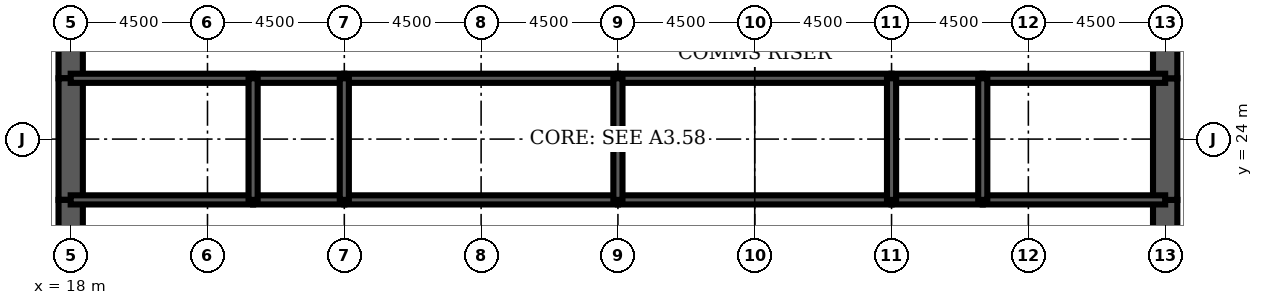
"""IFC4 building model, lengths in metres.
Left out: names, types, materials, properties, quantities, classifications, styles, units other than length and angle.
Written with IfcOpenShell. Run it as: python <this file> out.ifc"""

import sys

from ifc_helpers import new_model, si_unit, direction, frame, frame_2d, origin, place, context, subcontext, project, spatial, rectangle, extrude, element, fill, save


model = new_model("IFC4")
c1 = context("Model", 3, precision=1e-05, world=origin(), true_north=direction((0.0, 1.0)))
c2 = subcontext(c1, "Body", "Model", "MODEL_VIEW")
j1 = project(units=[si_unit("LENGTHUNIT", "METRE"), si_unit("PLANEANGLEUNIT", "RADIAN")], contexts=[c1])
p1 = place(None, origin())
s1 = spatial("IfcSite", under=j1, at=p1, CompositionType="ELEMENT")
p2 = place(p1, origin())
s2 = spatial("IfcBuilding", under=s1, at=p2, CompositionType="ELEMENT")
p3 = place(p2, frame((0.0, 0.0, 248.8)))
s3 = spatial("IfcBuildingStorey", under=s2, at=p3, CompositionType="ELEMENT", Elevation=248.8)
p4 = place(p3, frame((18.0, 28.8, 0.0), z_axis=(0.0, 0.0, 1.0), x_axis=(0.0, -1.0, 0.0)))
e1 = element("IfcWall", 1, at=p4, inside=s3, PredefinedType="SHEAR", context=c2, shape_type="SweptSolid", body=[
    extrude(rectangle(XDim=2.8, YDim=0.8, at=frame_2d((1.4, 0.0))), origin(), (0.0, 0.0, 1.0), 4.2),
])
p5 = place(p4, frame((0.4, 0.0, 0.0)))
e2 = element("IfcOpeningElement", 2, at=p5, cuts=e1, PredefinedType="OPENING", context=c2, shape_type="SweptSolid", body=[
    extrude(rectangle(XDim=1.8, YDim=2.1, at=frame_2d((0.9, 1.05))), frame((0.0, 0.41, 0.0), z_axis=(0.0, -1.0, 0.0), x_axis=(1.0, 0.0, 0.0)), (0.0, 0.0, 1.0), 0.82),
])
p6 = place(p3, frame((18.0, 26.0, 0.0), z_axis=(0.0, 0.0, 1.0), x_axis=(0.0, -1.0, 0.0)))
e3 = element("IfcWall", 3, at=p6, inside=s3, PredefinedType="SHEAR", context=c2, shape_type="SweptSolid", body=[
    extrude(rectangle(XDim=4.0, YDim=0.8, at=frame_2d((2.0, 0.0))), origin(), (0.0, 0.0, 1.0), 4.2),
])
p7 = place(p3, frame((18.0, 22.0, 0.0), z_axis=(0.0, 0.0, 1.0), x_axis=(0.0, -1.0, 0.0)))
e4 = element("IfcWall", 4, at=p7, inside=s3, PredefinedType="SHEAR", context=c2, shape_type="SweptSolid", body=[
    extrude(rectangle(XDim=2.8, YDim=0.8, at=frame_2d((1.4, 0.0))), origin(), (0.0, 0.0, 1.0), 4.2),
])
p8 = place(p7, frame((0.6, 0.0, 0.0)))
e5 = element("IfcOpeningElement", 5, at=p8, cuts=e4, PredefinedType="OPENING", context=c2, shape_type="SweptSolid", body=[
    extrude(rectangle(XDim=1.8, YDim=2.1, at=frame_2d((0.9, 1.05))), frame((0.0, 0.41, 0.0), z_axis=(0.0, -1.0, 0.0), x_axis=(1.0, 0.0, 0.0)), (0.0, 0.0, 1.0), 0.82),
])
p9 = place(p3, frame((54.0, 19.2, 0.0), z_axis=(0.0, 0.0, 1.0), x_axis=(0.0, 1.0, 0.0)))
e6 = element("IfcWall", 6, at=p9, inside=s3, PredefinedType="SHEAR", context=c2, shape_type="SweptSolid", body=[
    extrude(rectangle(XDim=2.8, YDim=0.8, at=frame_2d((1.4, 0.0))), origin(), (0.0, 0.0, 1.0), 4.2),
])
p10 = place(p9, frame((0.4, 0.0, 0.0)))
e7 = element("IfcOpeningElement", 7, at=p10, cuts=e6, PredefinedType="OPENING", context=c2, shape_type="SweptSolid", body=[
    extrude(rectangle(XDim=1.8, YDim=2.1, at=frame_2d((0.9, 1.05))), frame((0.0, 0.41, 0.0), z_axis=(0.0, -1.0, 0.0), x_axis=(1.0, 0.0, 0.0)), (0.0, 0.0, 1.0), 0.82),
])
p11 = place(p3, frame((54.0, 22.0, 0.0), z_axis=(0.0, 0.0, 1.0), x_axis=(0.0, 1.0, 0.0)))
e8 = element("IfcWall", 8, at=p11, inside=s3, PredefinedType="SHEAR", context=c2, shape_type="SweptSolid", body=[
    extrude(rectangle(XDim=4.0, YDim=0.8, at=frame_2d((2.0, 0.0))), origin(), (0.0, 0.0, 1.0), 4.2),
])
p12 = place(p3, frame((54.0, 26.0, 0.0), z_axis=(0.0, 0.0, 1.0), x_axis=(0.0, 1.0, 0.0)))
e9 = element("IfcWall", 9, at=p12, inside=s3, PredefinedType="SHEAR", context=c2, shape_type="SweptSolid", body=[
    extrude(rectangle(XDim=2.8, YDim=0.8, at=frame_2d((1.4, 0.0))), origin(), (0.0, 0.0, 1.0), 4.2),
])
p13 = place(p12, frame((0.6, 0.0, 0.0)))
e10 = element("IfcOpeningElement", 10, at=p13, cuts=e9, PredefinedType="OPENING", context=c2, shape_type="SweptSolid", body=[
    extrude(rectangle(XDim=1.8, YDim=2.1, at=frame_2d((0.9, 1.05))), frame((0.0, 0.41, 0.0), z_axis=(0.0, -1.0, 0.0), x_axis=(1.0, 0.0, 0.0)), (0.0, 0.0, 1.0), 0.82),
])
p14 = place(p3, frame((18.0, 22.0, 0.0), z_axis=(0.0, 0.0, 1.0), x_axis=(1.0, 0.0, 0.0)))
e11 = element("IfcWall", 11, at=p14, inside=s3, PredefinedType="SOLIDWALL", context=c2, shape_type="SweptSolid", body=[
    extrude(rectangle(XDim=6.0, YDim=0.3, at=frame_2d((3.0, 0.0))), origin(), (0.0, 0.0, 1.0), 4.2),
])
p15 = place(p14, frame((4.4, 0.0, 0.0)))
e12 = element("IfcOpeningElement", 12, at=p15, cuts=e11, PredefinedType="OPENING", context=c2, shape_type="SweptSolid", body=[
    extrude(rectangle(XDim=1.0, YDim=2.1, at=frame_2d((0.5, 1.05))), frame((0.0, 0.16, 0.0), z_axis=(0.0, -1.0, 0.0), x_axis=(1.0, 0.0, 0.0)), (0.0, 0.0, 1.0), 0.32),
])
p16 = place(p14, frame((0.95, 0.0, 0.0)))
e13 = element("IfcOpeningElement", 13, at=p16, cuts=e11, PredefinedType="OPENING", context=c2, shape_type="SweptSolid", body=[
    extrude(rectangle(XDim=1.0, YDim=2.1, at=frame_2d((0.5, 1.05))), frame((0.0, 0.16, 0.0), z_axis=(0.0, -1.0, 0.0), x_axis=(1.0, 0.0, 0.0)), (0.0, 0.0, 1.0), 0.32),
])
p17 = place(p3, frame((24.0, 22.0, 0.0), z_axis=(0.0, 0.0, 1.0), x_axis=(1.0, 0.0, 0.0)))
e14 = element("IfcWall", 14, at=p17, inside=s3, PredefinedType="SOLIDWALL", context=c2, shape_type="SweptSolid", body=[
    extrude(rectangle(XDim=3.0, YDim=0.3, at=frame_2d((1.5, 0.0))), origin(), (0.0, 0.0, 1.0), 4.2),
])
p18 = place(p17, frame((1.0, 0.0, 0.0)))
e15 = element("IfcOpeningElement", 15, at=p18, cuts=e14, PredefinedType="OPENING", context=c2, shape_type="SweptSolid", body=[
    extrude(rectangle(XDim=1.0, YDim=2.1, at=frame_2d((0.5, 1.05))), frame((0.0, 0.16, 0.0), z_axis=(0.0, -1.0, 0.0), x_axis=(1.0, 0.0, 0.0)), (0.0, 0.0, 1.0), 0.32),
])
p19 = place(p3, frame((27.0, 22.0, 0.0), z_axis=(0.0, 0.0, 1.0), x_axis=(1.0, 0.0, 0.0)))
e16 = element("IfcWall", 16, at=p19, inside=s3, PredefinedType="SOLIDWALL", context=c2, shape_type="SweptSolid", body=[
    extrude(rectangle(XDim=9.0, YDim=0.3, at=frame_2d((4.5, 0.0))), origin(), (0.0, 0.0, 1.0), 4.2),
])
p20 = place(p19, frame((4.0, 0.0, 0.0)))
e17 = element("IfcOpeningElement", 17, at=p20, cuts=e16, PredefinedType="OPENING", context=c2, shape_type="SweptSolid", body=[
    extrude(rectangle(XDim=1.0, YDim=2.1, at=frame_2d((0.5, 1.05))), frame((0.0, 0.16, 0.0), z_axis=(0.0, -1.0, 0.0), x_axis=(1.0, 0.0, 0.0)), (0.0, 0.0, 1.0), 0.32),
])
p21 = place(p3, frame((36.0, 22.0, 0.0), z_axis=(0.0, 0.0, 1.0), x_axis=(1.0, 0.0, 0.0)))
e18 = element("IfcWall", 18, at=p21, inside=s3, PredefinedType="SOLIDWALL", context=c2, shape_type="SweptSolid", body=[
    extrude(rectangle(XDim=9.0, YDim=0.3, at=frame_2d((4.5, 0.0))), origin(), (0.0, 0.0, 1.0), 4.2),
])
p22 = place(p21, frame((4.0, 0.0, 0.0)))
e19 = element("IfcOpeningElement", 19, at=p22, cuts=e18, PredefinedType="OPENING", context=c2, shape_type="SweptSolid", body=[
    extrude(rectangle(XDim=1.0, YDim=2.1, at=frame_2d((0.5, 1.05))), frame((0.0, 0.16, 0.0), z_axis=(0.0, -1.0, 0.0), x_axis=(1.0, 0.0, 0.0)), (0.0, 0.0, 1.0), 0.32),
])
p23 = place(p3, frame((45.0, 22.0, 0.0), z_axis=(0.0, 0.0, 1.0), x_axis=(1.0, 0.0, 0.0)))
e20 = element("IfcWall", 20, at=p23, inside=s3, PredefinedType="SOLIDWALL", context=c2, shape_type="SweptSolid", body=[
    extrude(rectangle(XDim=3.0, YDim=0.3, at=frame_2d((1.5, 0.0))), origin(), (0.0, 0.0, 1.0), 4.2),
])
p24 = place(p23, frame((1.0, 0.0, 0.0)))
e21 = element("IfcOpeningElement", 21, at=p24, cuts=e20, PredefinedType="OPENING", context=c2, shape_type="SweptSolid", body=[
    extrude(rectangle(XDim=1.0, YDim=2.1, at=frame_2d((0.5, 1.05))), frame((0.0, 0.16, 0.0), z_axis=(0.0, -1.0, 0.0), x_axis=(1.0, 0.0, 0.0)), (0.0, 0.0, 1.0), 0.32),
])
p25 = place(p3, frame((48.0, 22.0, 0.0), z_axis=(0.0, 0.0, 1.0), x_axis=(1.0, 0.0, 0.0)))
e22 = element("IfcWall", 22, at=p25, inside=s3, PredefinedType="SOLIDWALL", context=c2, shape_type="SweptSolid", body=[
    extrude(rectangle(XDim=6.0, YDim=0.3, at=frame_2d((3.0, 0.0))), origin(), (0.0, 0.0, 1.0), 4.2),
])
p26 = place(p25, frame((2.0, 0.0, 0.0)))
e23 = element("IfcOpeningElement", 23, at=p26, cuts=e22, PredefinedType="OPENING", context=c2, shape_type="SweptSolid", body=[
    extrude(rectangle(XDim=1.0, YDim=2.1, at=frame_2d((0.5, 1.05))), frame((0.0, 0.16, 0.0), z_axis=(0.0, -1.0, 0.0), x_axis=(1.0, 0.0, 0.0)), (0.0, 0.0, 1.0), 0.32),
])
p27 = place(p3, frame((18.0, 26.0, 0.0), z_axis=(0.0, 0.0, 1.0), x_axis=(1.0, 0.0, 0.0)))
e24 = element("IfcWall", 24, at=p27, inside=s3, PredefinedType="SOLIDWALL", context=c2, shape_type="SweptSolid", body=[
    extrude(rectangle(XDim=6.0, YDim=0.3, at=frame_2d((3.0, 0.0))), origin(), (0.0, 0.0, 1.0), 4.2),
])
p28 = place(p3, frame((24.0, 26.0, 0.0), z_axis=(0.0, 0.0, 1.0), x_axis=(1.0, 0.0, 0.0)))
e25 = element("IfcWall", 25, at=p28, inside=s3, PredefinedType="SOLIDWALL", context=c2, shape_type="SweptSolid", body=[
    extrude(rectangle(XDim=3.0, YDim=0.3, at=frame_2d((1.5, 0.0))), origin(), (0.0, 0.0, 1.0), 4.2),
])
for number, where, z_axis, x_axis in (
    (26, (27.0, 26.0, 0.0), (0.0, 0.0, 1.0), (1.0, 0.0, 0.0)),
    (27, (36.0, 26.0, 0.0), (0.0, 0.0, 1.0), (1.0, 0.0, 0.0)),
):
    element("IfcWall", number, at=place(p3, frame(where, z_axis=z_axis, x_axis=x_axis)), inside=s3, PredefinedType="SOLIDWALL", context=c2, shape_type="SweptSolid", body=[
        extrude(rectangle(XDim=9.0, YDim=0.3, at=frame_2d((4.5, 0.0))), origin(), (0.0, 0.0, 1.0), 4.2),
    ])
p29 = place(p3, frame((45.0, 26.0, 0.0), z_axis=(0.0, 0.0, 1.0), x_axis=(1.0, 0.0, 0.0)))
e28 = element("IfcWall", 28, at=p29, inside=s3, PredefinedType="SOLIDWALL", context=c2, shape_type="SweptSolid", body=[
    extrude(rectangle(XDim=3.0, YDim=0.3, at=frame_2d((1.5, 0.0))), origin(), (0.0, 0.0, 1.0), 4.2),
])
p30 = place(p3, frame((48.0, 26.0, 0.0), z_axis=(0.0, 0.0, 1.0), x_axis=(1.0, 0.0, 0.0)))
e29 = element("IfcWall", 29, at=p30, inside=s3, PredefinedType="SOLIDWALL", context=c2, shape_type="SweptSolid", body=[
    extrude(rectangle(XDim=6.0, YDim=0.3, at=frame_2d((3.0, 0.0))), origin(), (0.0, 0.0, 1.0), 4.2),
])
for number, where, z_axis, x_axis in (
    (30, (24.0, 22.0, 0.0), (0.0, 0.0, 1.0), (0.0, 1.0, 0.0)),
    (31, (27.0, 22.0, 0.0), (0.0, 0.0, 1.0), (0.0, 1.0, 0.0)),
    (32, (36.0, 22.0, 0.0), (0.0, 0.0, 1.0), (0.0, 1.0, 0.0)),
    (33, (45.0, 22.0, 0.0), (0.0, 0.0, 1.0), (0.0, 1.0, 0.0)),
    (34, (48.0, 22.0, 0.0), (0.0, 0.0, 1.0), (0.0, 1.0, 0.0)),
):
    element("IfcWall", number, at=place(p3, frame(where, z_axis=z_axis, x_axis=x_axis)), inside=s3, PredefinedType="SOLIDWALL", context=c2, shape_type="SweptSolid", body=[
        extrude(rectangle(XDim=4.0, YDim=0.3, at=frame_2d((2.0, 0.0))), origin(), (0.0, 0.0, 1.0), 4.2),
    ])
p31 = place(p3, frame((42.0, 22.15, 0.0), z_axis=(0.0, 0.0, 1.0), x_axis=(0.0, 1.0, 0.0)))
e35 = element("IfcWall", 35, at=p31, inside=s3, PredefinedType="PARTITIONING", context=c2, shape_type="SweptSolid", body=[
    extrude(rectangle(XDim=3.7, YDim=0.15, at=frame_2d((1.85, 0.0))), origin(), (0.0, 0.0, 1.0), 3.0),
])
p32 = place(p31, frame((2.2, 0.0, 0.0)))
e36 = element("IfcOpeningElement", 36, at=p32, cuts=e35, PredefinedType="OPENING", context=c2, shape_type="SweptSolid", body=[
    extrude(rectangle(XDim=1.0, YDim=2.1, at=frame_2d((0.5, 1.05))), frame((0.0, 0.085, 0.0), z_axis=(0.0, -1.0, 0.0), x_axis=(1.0, 0.0, 0.0)), (0.0, 0.0, 1.0), 0.17),
])
p33 = place(p3, frame((20.575, 22.15, 0.0), z_axis=(0.0, 0.0, 1.0), x_axis=(0.0, 1.0, 0.0)))
e37 = element("IfcWall", 37, at=p33, inside=s3, PredefinedType="PARTITIONING", context=c2, shape_type="SweptSolid", body=[
    extrude(rectangle(XDim=3.7, YDim=0.15, at=frame_2d((1.85, 0.0))), origin(), (0.0, 0.0, 1.0), 3.0),
])
p34 = place(p3, frame((49.4, 19.35, 0.0), z_axis=(0.0, 0.0, 1.0), x_axis=(0.0, 1.0, 0.0)))
e38 = element("IfcWall", 38, at=p34, inside=s3, PredefinedType="PARTITIONING", context=c2, shape_type="SweptSolid", body=[
    extrude(rectangle(XDim=2.5, YDim=0.15, at=frame_2d((1.25, 0.0))), origin(), (0.0, 0.0, 1.0), 3.0),
])
p35 = place(p34, frame((1.15, 0.0, 0.0)))
e39 = element("IfcOpeningElement", 39, at=p35, cuts=e38, PredefinedType="OPENING", context=c2, shape_type="SweptSolid", body=[
    extrude(rectangle(XDim=1.0, YDim=2.1, at=frame_2d((0.5, 1.05))), frame((0.0, 0.085, 0.0), z_axis=(0.0, -1.0, 0.0), x_axis=(1.0, 0.0, 0.0)), (0.0, 0.0, 1.0), 0.17),
])
p36 = place(p32, origin())
e40 = element("IfcDoor", 40, at=p36, inside=s3, OperationType="SINGLE_SWING_RIGHT", PredefinedType="DOOR", context=c2, shape_type="SweptSolid", body=[
    extrude(rectangle(XDim=1.0, YDim=2.1, at=frame_2d((0.5, 1.05))), frame((0.0, 0.025, 0.0), z_axis=(0.0, -1.0, 0.0), x_axis=(1.0, 0.0, 0.0)), (0.0, 0.0, 1.0), 0.05),
])
fill(e36, e40)
p37 = place(p35, origin())
e41 = element("IfcDoor", 41, at=p37, inside=s3, OperationType="SINGLE_SWING_RIGHT", PredefinedType="DOOR", context=c2, shape_type="SweptSolid", body=[
    extrude(rectangle(XDim=1.0, YDim=2.1, at=frame_2d((0.5, 1.05))), frame((0.0, 0.025, 0.0), z_axis=(0.0, -1.0, 0.0), x_axis=(1.0, 0.0, 0.0)), (0.0, 0.0, 1.0), 0.05),
])
fill(e39, e41)
p38 = place(p8, origin())
e42 = element("IfcDoor", 42, at=p38, inside=s3, OperationType="SINGLE_SWING_LEFT", PredefinedType="DOOR", context=c2, shape_type="SweptSolid", body=[
    extrude(rectangle(XDim=1.8, YDim=2.1, at=frame_2d((0.9, 1.05))), frame((0.0, 0.4, 0.0), z_axis=(0.0, -1.0, 0.0), x_axis=(1.0, 0.0, 0.0)), (0.0, 0.0, 1.0), 0.8),
])
fill(e5, e42)
p39 = place(p5, origin())
e43 = element("IfcDoor", 43, at=p39, inside=s3, OperationType="SINGLE_SWING_LEFT", PredefinedType="DOOR", context=c2, shape_type="SweptSolid", body=[
    extrude(rectangle(XDim=1.8, YDim=2.1, at=frame_2d((0.9, 1.05))), frame((0.0, 0.4, 0.0), z_axis=(0.0, -1.0, 0.0), x_axis=(1.0, 0.0, 0.0)), (0.0, 0.0, 1.0), 0.8),
])
fill(e2, e43)
p40 = place(p10, origin())
e44 = element("IfcDoor", 44, at=p40, inside=s3, OperationType="SINGLE_SWING_LEFT", PredefinedType="DOOR", context=c2, shape_type="SweptSolid", body=[
    extrude(rectangle(XDim=1.8, YDim=2.1, at=frame_2d((0.9, 1.05))), frame((0.0, 0.4, 0.0), z_axis=(0.0, -1.0, 0.0), x_axis=(1.0, 0.0, 0.0)), (0.0, 0.0, 1.0), 0.8),
])
fill(e7, e44)
p41 = place(p13, origin())
e45 = element("IfcDoor", 45, at=p41, inside=s3, OperationType="SINGLE_SWING_LEFT", PredefinedType="DOOR", context=c2, shape_type="SweptSolid", body=[
    extrude(rectangle(XDim=1.8, YDim=2.1, at=frame_2d((0.9, 1.05))), frame((0.0, 0.4, 0.0), z_axis=(0.0, -1.0, 0.0), x_axis=(1.0, 0.0, 0.0)), (0.0, 0.0, 1.0), 0.8),
])
fill(e10, e45)
p42 = place(p15, origin())
e46 = element("IfcDoor", 46, at=p42, inside=s3, OperationType="SINGLE_SWING_RIGHT", PredefinedType="DOOR", context=c2, shape_type="SweptSolid", body=[
    extrude(rectangle(XDim=1.0, YDim=2.1, at=frame_2d((0.5, 1.05))), frame((0.0, 0.025, 0.0), z_axis=(0.0, -1.0, 0.0), x_axis=(1.0, 0.0, 0.0)), (0.0, 0.0, 1.0), 0.05),
])
fill(e12, e46)
p43 = place(p18, origin())
e47 = element("IfcDoor", 47, at=p43, inside=s3, OperationType="SINGLE_SWING_LEFT", PredefinedType="DOOR", context=c2, shape_type="SweptSolid", body=[
    extrude(rectangle(XDim=1.0, YDim=2.1, at=frame_2d((0.5, 1.05))), frame((0.0, 0.025, 0.0), z_axis=(0.0, -1.0, 0.0), x_axis=(1.0, 0.0, 0.0)), (0.0, 0.0, 1.0), 0.05),
])
fill(e15, e47)
p44 = place(p20, origin())
e48 = element("IfcDoor", 48, at=p44, inside=s3, OperationType="SINGLE_SWING_LEFT", PredefinedType="DOOR", context=c2, shape_type="SweptSolid", body=[
    extrude(rectangle(XDim=1.0, YDim=2.1, at=frame_2d((0.5, 1.05))), frame((0.0, 0.025, 0.0), z_axis=(0.0, -1.0, 0.0), x_axis=(1.0, 0.0, 0.0)), (0.0, 0.0, 1.0), 0.05),
])
fill(e17, e48)
p45 = place(p22, origin())
e49 = element("IfcDoor", 49, at=p45, inside=s3, OperationType="SINGLE_SWING_LEFT", PredefinedType="DOOR", context=c2, shape_type="SweptSolid", body=[
    extrude(rectangle(XDim=1.0, YDim=2.1, at=frame_2d((0.5, 1.05))), frame((0.0, 0.025, 0.0), z_axis=(0.0, -1.0, 0.0), x_axis=(1.0, 0.0, 0.0)), (0.0, 0.0, 1.0), 0.05),
])
fill(e19, e49)
p46 = place(p24, origin())
e50 = element("IfcDoor", 50, at=p46, inside=s3, OperationType="SINGLE_SWING_LEFT", PredefinedType="DOOR", context=c2, shape_type="SweptSolid", body=[
    extrude(rectangle(XDim=1.0, YDim=2.1, at=frame_2d((0.5, 1.05))), frame((0.0, 0.025, 0.0), z_axis=(0.0, -1.0, 0.0), x_axis=(1.0, 0.0, 0.0)), (0.0, 0.0, 1.0), 0.05),
])
fill(e21, e50)
p47 = place(p26, origin())
e51 = element("IfcDoor", 51, at=p47, inside=s3, OperationType="SINGLE_SWING_LEFT", PredefinedType="DOOR", context=c2, shape_type="SweptSolid", body=[
    extrude(rectangle(XDim=1.0, YDim=2.1, at=frame_2d((0.5, 1.05))), frame((0.0, 0.025, 0.0), z_axis=(0.0, -1.0, 0.0), x_axis=(1.0, 0.0, 0.0)), (0.0, 0.0, 1.0), 0.05),
])
fill(e23, e51)
p48 = place(p16, origin())
e52 = element("IfcDoor", 52, at=p48, inside=s3, OperationType="SINGLE_SWING_LEFT", PredefinedType="DOOR", context=c2, shape_type="SweptSolid", body=[
    extrude(rectangle(XDim=1.0, YDim=2.1, at=frame_2d((0.5, 1.05))), frame((0.0, 0.025, 0.0), z_axis=(0.0, -1.0, 0.0), x_axis=(1.0, 0.0, 0.0)), (0.0, 0.0, 1.0), 0.05),
])
fill(e13, e52)
save(model, sys.argv[1])
